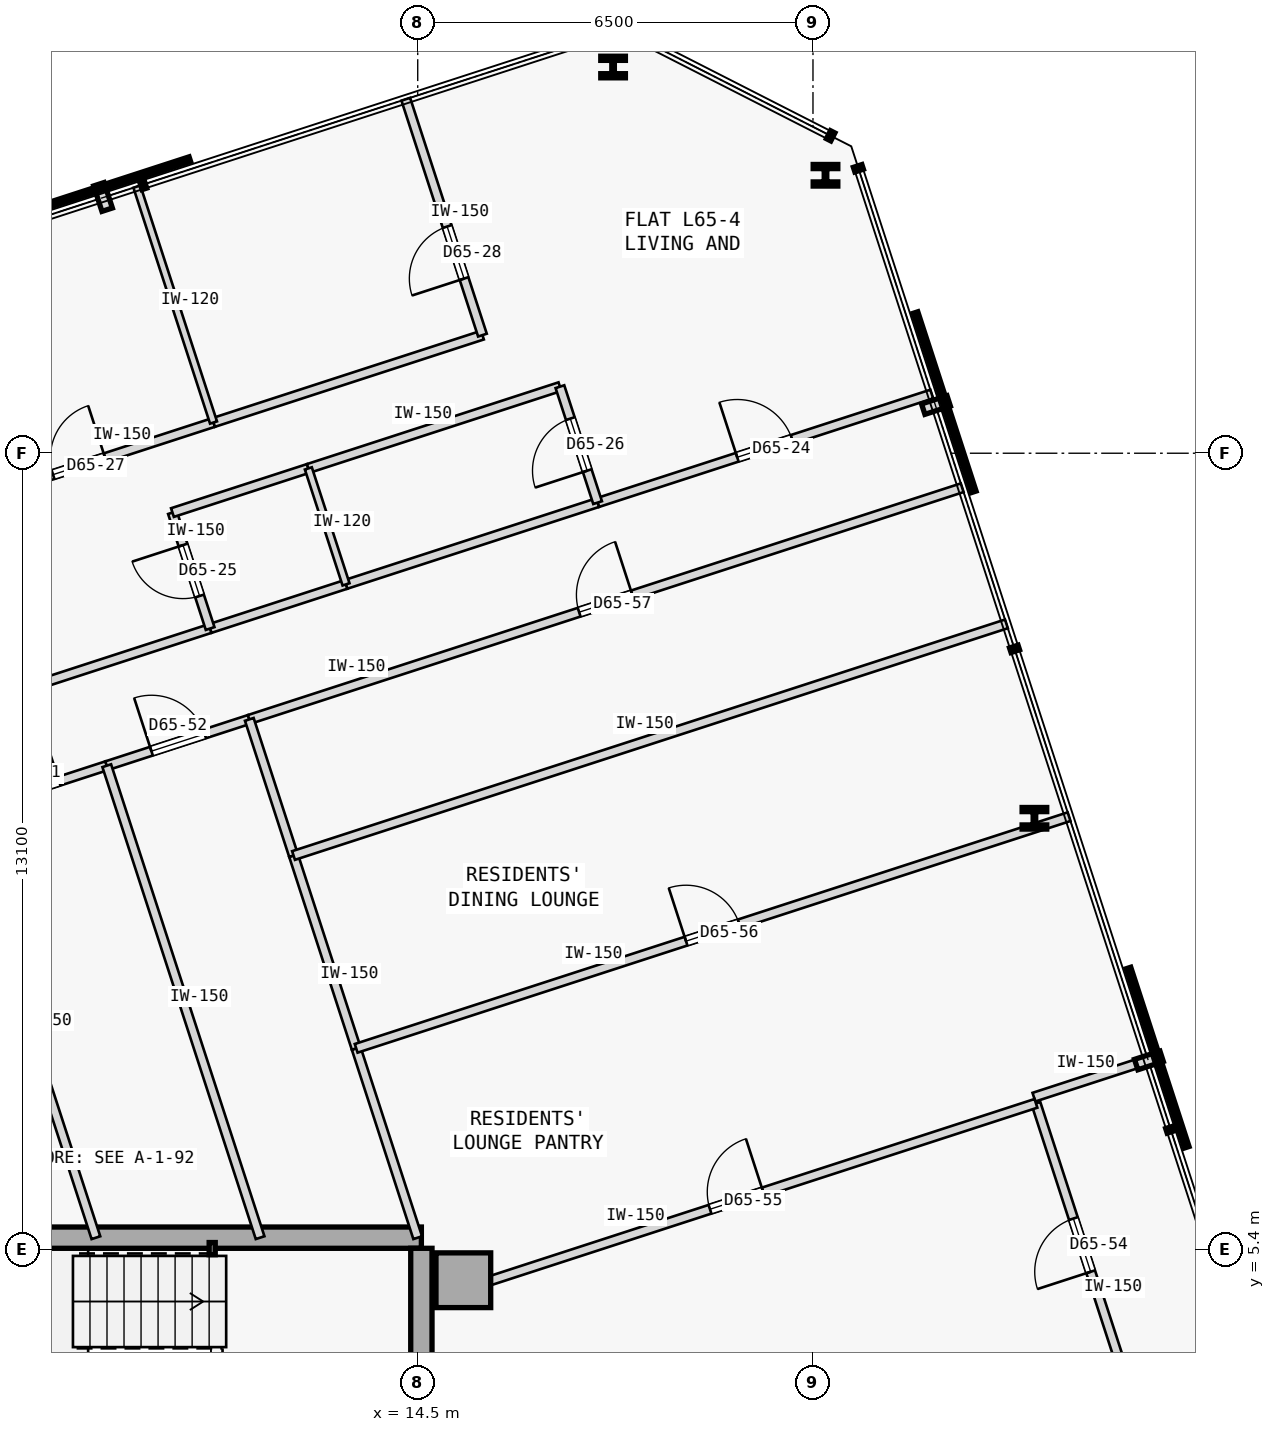
"""IFC4 building model, lengths in metres.
Left out: names, types, materials, properties, quantities, classifications, styles, units other than length and angle.
Written with IfcOpenShell. Run it as: python <this file> out.ifc"""

import sys

from ifc_helpers import new_model, si_unit, direction, frame, frame_2d, origin, origin_2d, place, context, subcontext, project, spatial, rectangle, hollow_rectangle, i_section, extrude, element, fill, save


model = new_model("IFC4")
c1 = context("Model", 3, precision=1e-05, world=origin(), true_north=direction((0.0, 1.0)))
c2 = subcontext(c1, "Body", "Model", "MODEL_VIEW")
j1 = project(units=[si_unit("LENGTHUNIT", "METRE"), si_unit("PLANEANGLEUNIT", "RADIAN")], contexts=[c1])
p1 = place(None, origin())
s1 = spatial("IfcSite", under=j1, at=p1, CompositionType="ELEMENT")
p2 = place(p1, origin())
s2 = spatial("IfcBuilding", under=s1, at=p2, CompositionType="ELEMENT")
p3 = place(p2, frame((0.0, 0.0, 244.4)))
s3 = spatial("IfcBuildingStorey", under=s2, at=p3, CompositionType="ELEMENT", Elevation=244.4)
p4 = place(p3, frame((15.25, 4.9, 0.0), z_axis=(0.0, 0.0, 1.0), x_axis=(1.0, 0.0, 0.0)))
e1 = element("IfcColumn", 1, at=p4, inside=s3, PredefinedType="COLUMN", context=c2, shape_type="SweptSolid", body=[
    extrude(rectangle(XDim=0.9, YDim=0.9, at=origin_2d()), origin(), (0.0, 0.0, 1.0), 3.35),
])
p5 = place(p3, frame((3.15, 5.6, 0.0), z_axis=(0.0, 0.0, 1.0), x_axis=(1.0, 0.0, 0.0)))
e2 = element("IfcWall", 2, at=p5, inside=s3, PredefinedType="SHEAR", context=c2, shape_type="SweptSolid", body=[
    extrude(rectangle(XDim=11.41, YDim=0.35, at=frame_2d((5.705, 0.0))), origin(), (0.0, 0.0, 1.0), 3.125),
])
p6 = place(p3, frame((14.56, -5.425, 0.0), z_axis=(0.0, 0.0, 1.0), x_axis=(0.0, 1.0, 0.0)))
e3 = element("IfcWall", 3, at=p6, inside=s3, PredefinedType="SHEAR", context=c2, shape_type="SweptSolid", body=[
    extrude(rectangle(XDim=10.85, YDim=0.35, at=frame_2d((5.425, 0.0))), origin(), (0.0, 0.0, 1.0), 3.125),
])
p7 = place(p3, frame((11.12, 5.42, 0.0), z_axis=(0.0, 0.0, 1.0), x_axis=(1.0, 0.0, 0.0)))
e4 = element("IfcColumn", 4, at=p7, inside=s3, PredefinedType="COLUMN", context=c2, shape_type="SweptSolid", body=[
    extrude(hollow_rectangle(XDim=0.1, YDim=0.2, WallThickness=0.008, at=origin_2d()), origin(), (0.0, 0.0, 1.0), 3.35),
])
for number, where, z_axis, x_axis in (
    (5, (24.642, 12.497, 0.0), (0.0, 0.0, 1.0), (1.0, 0.0, 0.0)),
    (6, (21.206, 23.071, 0.0), (0.0, 0.0, 1.0), (1.0, 0.0, 0.0)),
    (7, (17.713, 24.851, 0.0), (0.0, 0.0, 1.0), (1.0, 0.0, 0.0)),
):
    element("IfcColumn", number, at=place(p3, frame(where, z_axis=z_axis, x_axis=x_axis)), inside=s3, PredefinedType="COLUMN", context=c2, shape_type="SweptSolid", body=[
        extrude(i_section(OverallWidth=0.405, OverallDepth=0.355, WebThickness=0.042, FlangeThickness=0.068, FilletRadius=0.015, at=origin_2d()), origin(), (0.0, 0.0, 1.0), 3.35),
    ])
p8 = place(p3, frame((7.615, 14.489, 0.0), z_axis=(0.0, 0.0, 1.0), x_axis=(0.951050780541, 0.309034646652, 0.0)))
e8 = element("IfcWall", 8, at=p8, inside=s3, PredefinedType="PARTITIONING", context=c2, shape_type="SweptSolid", body=[
    extrude(rectangle(XDim=3.65, YDim=0.15, at=frame_2d((1.825, 0.0))), origin(), (0.0, 0.0, 1.0), 3.125),
])
p9 = place(p3, frame((17.458, 17.688, 0.0), z_axis=(0.0, 0.0, 1.0), x_axis=(0.951064183239, 0.308993396953, 0.0)))
e9 = element("IfcWall", 9, at=p9, inside=s3, PredefinedType="PARTITIONING", context=c2, shape_type="SweptSolid", body=[
    extrude(rectangle(XDim=5.778, YDim=0.15, at=frame_2d((2.889, 0.0))), origin(), (0.0, 0.0, 1.0), 3.125),
])
p10 = place(p9, frame((2.414, 0.0, 0.0)))
e10 = element("IfcOpeningElement", 10, at=p10, cuts=e9, PredefinedType="OPENING", context=c2, shape_type="SweptSolid", body=[
    extrude(rectangle(XDim=0.95, YDim=2.15, at=frame_2d((0.475, 1.075))), frame((0.0, 0.085, 0.0), z_axis=(0.0, -1.0, 0.0), x_axis=(1.0, 0.0, 0.0)), (0.0, 0.0, 1.0), 0.17),
])
p11 = place(p3, frame((11.086, 15.617, 0.0), z_axis=(0.0, 0.0, 1.0), x_axis=(0.951045519245, 0.309050837767, 0.0)))
e11 = element("IfcWall", 11, at=p11, inside=s3, PredefinedType="PARTITIONING", context=c2, shape_type="SweptSolid", body=[
    extrude(rectangle(XDim=2.35, YDim=0.15, at=frame_2d((1.175, 0.0))), origin(), (0.0, 0.0, 1.0), 3.125),
])
p12 = place(p3, frame((13.321, 16.344, 0.0), z_axis=(0.0, 0.0, 1.0), x_axis=(0.951052627573, 0.309028962374, 0.0)))
e12 = element("IfcWall", 12, at=p12, inside=s3, PredefinedType="PARTITIONING", context=c2, shape_type="SweptSolid", body=[
    extrude(rectangle(XDim=4.35, YDim=0.15, at=frame_2d((2.175, 0.0))), origin(), (0.0, 0.0, 1.0), 3.125),
])
p13 = place(p3, frame((6.944, 12.568, 0.0), z_axis=(0.0, 0.0, 1.0), x_axis=(0.951042451835, 0.309060276981, 0.0)))
e13 = element("IfcWall", 13, at=p13, inside=s3, PredefinedType="PARTITIONING", context=c2, shape_type="SweptSolid", body=[
    extrude(rectangle(XDim=2.568, YDim=0.15, at=frame_2d((1.284, 0.0))), origin(), (0.0, 0.0, 1.0), 3.125),
])
p14 = place(p13, frame((0.824, 0.0, 0.0)))
e14 = element("IfcOpeningElement", 14, at=p14, cuts=e13, PredefinedType="OPENING", context=c2, shape_type="SweptSolid", body=[
    extrude(rectangle(XDim=0.92, YDim=2.15, at=frame_2d((0.46, 1.075))), frame((0.0, 0.085, 0.0), z_axis=(0.0, -1.0, 0.0), x_axis=(1.0, 0.0, 0.0)), (0.0, 0.0, 1.0), 0.17),
])
p15 = place(p3, frame((9.386, 13.362, 0.0), z_axis=(0.0, 0.0, 1.0), x_axis=(0.951052991774, 0.309027841526, 0.0)))
e15 = element("IfcWall", 15, at=p15, inside=s3, PredefinedType="PARTITIONING", context=c2, shape_type="SweptSolid", body=[
    extrude(rectangle(XDim=2.465, YDim=0.15, at=frame_2d((1.232, 0.0))), origin(), (0.0, 0.0, 1.0), 3.125),
])
p16 = place(p15, frame((0.772, 0.0, 0.0)))
e16 = element("IfcOpeningElement", 16, at=p16, cuts=e15, PredefinedType="OPENING", context=c2, shape_type="SweptSolid", body=[
    extrude(rectangle(XDim=0.92, YDim=2.15, at=frame_2d((0.46, 1.075))), frame((0.0, 0.085, 0.0), z_axis=(0.0, -1.0, 0.0), x_axis=(1.0, 0.0, 0.0)), (0.0, 0.0, 1.0), 0.17),
])
p17 = place(p3, frame((26.182, 3.145, 0.0), z_axis=(0.0, 0.0, 1.0), x_axis=(-0.309019653166, 0.951055652397, 0.0)))
e17 = element("IfcWall", 17, at=p17, inside=s3, PredefinedType="PARTITIONING", context=c2, shape_type="SweptSolid", body=[
    extrude(rectangle(XDim=4.904, YDim=0.15, at=frame_2d((2.452, 0.0))), origin(), (0.0, 0.0, 1.0), 3.125),
])
p18 = place(p17, frame((1.992, 0.0, 0.0)))
e18 = element("IfcOpeningElement", 18, at=p18, cuts=e17, PredefinedType="OPENING", context=c2, shape_type="SweptSolid", body=[
    extrude(rectangle(XDim=0.92, YDim=2.15, at=frame_2d((0.46, 1.075))), frame((0.0, 0.085, 0.0), z_axis=(0.0, -1.0, 0.0), x_axis=(1.0, 0.0, 0.0)), (0.0, 0.0, 1.0), 0.17),
])
p19 = place(p3, frame((24.634, 7.91, 0.0), z_axis=(0.0, 0.0, 1.0), x_axis=(0.951054051148, 0.309024581215, 0.0)))
e19 = element("IfcWall", 19, at=p19, inside=s3, PredefinedType="PARTITIONING", context=c2, shape_type="SweptSolid", body=[
    extrude(rectangle(XDim=1.975, YDim=0.15, at=frame_2d((0.988, 0.0))), origin(), (0.0, 0.0, 1.0), 3.125),
])
p20 = place(p3, frame((11.73, 14.123, 0.0), z_axis=(0.0, 0.0, 1.0), x_axis=(0.951060263663, 0.309005460926, 0.0)))
e20 = element("IfcWall", 20, at=p20, inside=s3, PredefinedType="PARTITIONING", context=c2, shape_type="SweptSolid", body=[
    extrude(rectangle(XDim=12.327, YDim=0.15, at=frame_2d((6.164, 0.0))), origin(), (0.0, 0.0, 1.0), 3.125),
])
p21 = place(p20, frame((5.704, 0.0, 0.0)))
e21 = element("IfcOpeningElement", 21, at=p21, cuts=e20, PredefinedType="OPENING", context=c2, shape_type="SweptSolid", body=[
    extrude(rectangle(XDim=0.92, YDim=2.15, at=frame_2d((0.46, 1.075))), frame((0.0, 0.085, 0.0), z_axis=(0.0, -1.0, 0.0), x_axis=(1.0, 0.0, 0.0)), (0.0, 0.0, 1.0), 0.17),
])
p22 = place(p3, frame((11.086, 15.617, 0.0), z_axis=(0.0, 0.0, 1.0), x_axis=(-0.309022749039, 0.951054646472, 0.0)))
e22 = element("IfcWall", 22, at=p22, inside=s3, PredefinedType="PARTITIONING", context=c2, shape_type="SweptSolid", body=[
    extrude(rectangle(XDim=2.005, YDim=0.15, at=frame_2d((1.002, 0.0))), origin(), (0.0, 0.0, 1.0), 3.125),
])
p23 = place(p22, frame((0.562, 0.0, 0.0)))
e23 = element("IfcOpeningElement", 23, at=p23, cuts=e22, PredefinedType="OPENING", context=c2, shape_type="SweptSolid", body=[
    extrude(rectangle(XDim=0.88, YDim=2.15, at=frame_2d((0.44, 1.075))), frame((0.0, 0.085, 0.0), z_axis=(0.0, -1.0, 0.0), x_axis=(1.0, 0.0, 0.0)), (0.0, 0.0, 1.0), 0.17),
])
p24 = place(p3, frame((10.466, 17.524, 0.0), z_axis=(0.0, 0.0, 1.0), x_axis=(0.951076048914, 0.308956872689, 0.0)))
e24 = element("IfcWall", 24, at=p24, inside=s3, PredefinedType="PARTITIONING", context=c2, shape_type="SweptSolid", body=[
    extrude(rectangle(XDim=2.35, YDim=0.15, at=frame_2d((1.175, 0.0))), origin(), (0.0, 0.0, 1.0), 3.125),
])
p25 = place(p3, frame((12.701, 18.25, 0.0), z_axis=(0.0, 0.0, 1.0), x_axis=(0.951052627573, 0.309028962374, 0.0)))
e25 = element("IfcWall", 25, at=p25, inside=s3, PredefinedType="PARTITIONING", context=c2, shape_type="SweptSolid", body=[
    extrude(rectangle(XDim=4.35, YDim=0.15, at=frame_2d((2.175, 0.0))), origin(), (0.0, 0.0, 1.0), 3.125),
])
p26 = place(p3, frame((17.458, 17.688, 0.0), z_axis=(0.0, 0.0, 1.0), x_axis=(-0.309058537449, 0.951043017129, 0.0)))
e26 = element("IfcWall", 26, at=p26, inside=s3, PredefinedType="PARTITIONING", context=c2, shape_type="SweptSolid", body=[
    extrude(rectangle(XDim=2.005, YDim=0.15, at=frame_2d((1.002, 0.0))), origin(), (0.0, 0.0, 1.0), 3.125),
])
p27 = place(p26, frame((0.552, 0.0, 0.0)))
e27 = element("IfcOpeningElement", 27, at=p27, cuts=e26, PredefinedType="OPENING", context=c2, shape_type="SweptSolid", body=[
    extrude(rectangle(XDim=0.9, YDim=2.15, at=frame_2d((0.45, 1.075))), frame((0.0, 0.085, 0.0), z_axis=(0.0, -1.0, 0.0), x_axis=(1.0, 0.0, 0.0)), (0.0, 0.0, 1.0), 0.17),
])
p28 = place(p3, frame((6.719, 17.568, 0.0), z_axis=(0.0, 0.0, 1.0), x_axis=(0.951050272606, 0.309036209813, 0.0)))
e28 = element("IfcWall", 28, at=p28, inside=s3, PredefinedType="PARTITIONING", context=c2, shape_type="SweptSolid", body=[
    extrude(rectangle(XDim=4.65, YDim=0.15, at=frame_2d((2.325, 0.0))), origin(), (0.0, 0.0, 1.0), 3.125),
])
p29 = place(p28, frame((1.875, 0.0, 0.0)))
e29 = element("IfcOpeningElement", 29, at=p29, cuts=e28, PredefinedType="OPENING", context=c2, shape_type="SweptSolid", body=[
    extrude(rectangle(XDim=0.9, YDim=2.15, at=frame_2d((0.45, 1.075))), frame((0.0, 0.085, 0.0), z_axis=(0.0, -1.0, 0.0), x_axis=(1.0, 0.0, 0.0)), (0.0, 0.0, 1.0), 0.17),
])
p30 = place(p3, frame((11.142, 19.005, 0.0), z_axis=(0.0, 0.0, 1.0), x_axis=(0.951065702951, 0.308988719326, 0.0)))
e30 = element("IfcWall", 30, at=p30, inside=s3, PredefinedType="PARTITIONING", context=c2, shape_type="SweptSolid", body=[
    extrude(rectangle(XDim=4.65, YDim=0.15, at=frame_2d((2.325, 0.0))), origin(), (0.0, 0.0, 1.0), 3.125),
])
p31 = place(p3, frame((15.564, 20.442, 0.0), z_axis=(0.0, 0.0, 1.0), x_axis=(-0.309018403393, 0.951056058476, 0.0)))
e31 = element("IfcWall", 31, at=p31, inside=s3, PredefinedType="PARTITIONING", context=c2, shape_type="SweptSolid", body=[
    extrude(rectangle(XDim=4.079, YDim=0.15, at=frame_2d((2.04, 0.0))), origin(), (0.0, 0.0, 1.0), 3.125),
])
p32 = place(p31, frame((0.978, 0.0, 0.0)))
e32 = element("IfcOpeningElement", 32, at=p32, cuts=e31, PredefinedType="OPENING", context=c2, shape_type="SweptSolid", body=[
    extrude(rectangle(XDim=0.9, YDim=2.15, at=frame_2d((0.45, 1.075))), frame((0.0, 0.085, 0.0), z_axis=(0.0, -1.0, 0.0), x_axis=(1.0, 0.0, 0.0)), (0.0, 0.0, 1.0), 0.17),
])
p33 = place(p3, frame((13.321, 16.344, 0.0), z_axis=(0.0, 0.0, 1.0), x_axis=(-0.309058537449, 0.951043017129, 0.0)))
e33 = element("IfcWall", 33, at=p33, inside=s3, PredefinedType="PARTITIONING", context=c2, shape_type="SweptSolid", body=[
    extrude(rectangle(XDim=2.005, YDim=0.12, at=frame_2d((1.002, 0.0))), origin(), (0.0, 0.0, 1.0), 3.125),
])
p34 = place(p3, frame((11.142, 19.005, 0.0), z_axis=(0.0, 0.0, 1.0), x_axis=(-0.309018403393, 0.951056058476, 0.0)))
e34 = element("IfcWall", 34, at=p34, inside=s3, PredefinedType="PARTITIONING", context=c2, shape_type="SweptSolid", body=[
    extrude(rectangle(XDim=4.079, YDim=0.12, at=frame_2d((2.04, 0.0))), origin(), (0.0, 0.0, 1.0), 3.125),
])
p35 = place(p3, frame((9.208, 5.6, 0.0), z_axis=(0.0, 0.0, 1.0), x_axis=(-0.309021275068, 0.951055125403, 0.0)))
e35 = element("IfcWall", 35, at=p35, inside=s3, PredefinedType="PARTITIONING", context=c2, shape_type="SweptSolid", body=[
    extrude(rectangle(XDim=7.327, YDim=0.15, at=frame_2d((3.664, 0.0))), origin(), (0.0, 0.0, 1.0), 3.125),
])
p36 = place(p3, frame((11.908, 5.6, 0.0), z_axis=(0.0, 0.0, 1.0), x_axis=(-0.308994076163, 0.951063962568, 0.0)))
e36 = element("IfcWall", 36, at=p36, inside=s3, PredefinedType="PARTITIONING", context=c2, shape_type="SweptSolid", body=[
    extrude(rectangle(XDim=8.161, YDim=0.15, at=frame_2d((4.081, 0.0))), origin(), (0.0, 0.0, 1.0), 3.125),
])
p37 = place(p3, frame((14.5, 5.6, 0.0), z_axis=(0.0, 0.0, 1.0), x_axis=(-0.309015253813, 0.951057081836, 0.0)))
e37 = element("IfcWall", 37, at=p37, inside=s3, PredefinedType="PARTITIONING", context=c2, shape_type="SweptSolid", body=[
    extrude(rectangle(XDim=3.274, YDim=0.15, at=frame_2d((1.637, 0.0))), origin(), (0.0, 0.0, 1.0), 3.125),
])
p38 = place(p3, frame((13.488, 8.714, 0.0), z_axis=(0.0, 0.0, 1.0), x_axis=(-0.308946982245, 0.951079261766, 0.0)))
e38 = element("IfcWall", 38, at=p38, inside=s3, PredefinedType="PARTITIONING", context=c2, shape_type="SweptSolid", body=[
    extrude(rectangle(XDim=3.334, YDim=0.15, at=frame_2d((1.667, 0.0))), origin(), (0.0, 0.0, 1.0), 3.125),
])
p39 = place(p3, frame((12.458, 11.885, 0.0), z_axis=(0.0, 0.0, 1.0), x_axis=(-0.309062621189, 0.951041690035, 0.0)))
e39 = element("IfcWall", 39, at=p39, inside=s3, PredefinedType="PARTITIONING", context=c2, shape_type="SweptSolid", body=[
    extrude(rectangle(XDim=2.354, YDim=0.15, at=frame_2d((1.177, 0.0))), origin(), (0.0, 0.0, 1.0), 3.125),
])
p40 = place(p3, frame((14.821, 4.61, 0.0), z_axis=(0.0, 0.0, 1.0), x_axis=(0.951063700751, 0.30899488202, 0.0)))
e40 = element("IfcWall", 40, at=p40, inside=s3, PredefinedType="PARTITIONING", context=c2, shape_type="SweptSolid", body=[
    extrude(rectangle(XDim=10.352, YDim=0.15, at=frame_2d((5.176, 0.0))), origin(), (0.0, 0.0, 1.0), 3.125),
])
p41 = place(p40, frame((4.716, 0.0, 0.0)))
e41 = element("IfcOpeningElement", 41, at=p41, cuts=e40, PredefinedType="OPENING", context=c2, shape_type="SweptSolid", body=[
    extrude(rectangle(XDim=0.92, YDim=2.15, at=frame_2d((0.46, 1.075))), frame((0.0, 0.085, 0.0), z_axis=(0.0, -1.0, 0.0), x_axis=(1.0, 0.0, 0.0)), (0.0, 0.0, 1.0), 0.17),
])
p42 = place(p3, frame((13.488, 8.714, 0.0), z_axis=(0.0, 0.0, 1.0), x_axis=(0.951062154725, 0.308999640533, 0.0)))
e42 = element("IfcWall", 42, at=p42, inside=s3, PredefinedType="PARTITIONING", context=c2, shape_type="SweptSolid", body=[
    extrude(rectangle(XDim=12.327, YDim=0.15, at=frame_2d((6.164, 0.0))), origin(), (0.0, 0.0, 1.0), 3.125),
])
p43 = place(p42, frame((5.704, 0.0, 0.0)))
e43 = element("IfcOpeningElement", 43, at=p43, cuts=e42, PredefinedType="OPENING", context=c2, shape_type="SweptSolid", body=[
    extrude(rectangle(XDim=0.92, YDim=2.15, at=frame_2d((0.46, 1.075))), frame((0.0, 0.085, 0.0), z_axis=(0.0, -1.0, 0.0), x_axis=(1.0, 0.0, 0.0)), (0.0, 0.0, 1.0), 0.17),
])
p44 = place(p3, frame((12.458, 11.885, 0.0), z_axis=(0.0, 0.0, 1.0), x_axis=(0.951060263663, 0.309005460926, 0.0)))
e44 = element("IfcWall", 44, at=p44, inside=s3, PredefinedType="PARTITIONING", context=c2, shape_type="SweptSolid", body=[
    extrude(rectangle(XDim=12.327, YDim=0.15, at=frame_2d((6.164, 0.0))), origin(), (0.0, 0.0, 1.0), 3.125),
])
p45 = place(p10, origin())
e45 = element("IfcDoor", 45, at=p45, inside=s3, OperationType="SINGLE_SWING_LEFT", PredefinedType="DOOR", context=c2, shape_type="SweptSolid", body=[
    extrude(rectangle(XDim=0.95, YDim=2.15, at=frame_2d((0.475, 1.075))), frame((0.0, 0.025, 0.0), z_axis=(0.0, -1.0, 0.0), x_axis=(1.0, 0.0, 0.0)), (0.0, 0.0, 1.0), 0.05),
])
fill(e10, e45)
p46 = place(p23, origin())
e46 = element("IfcDoor", 46, at=p46, inside=s3, OperationType="SINGLE_SWING_RIGHT", PredefinedType="DOOR", context=c2, shape_type="SweptSolid", body=[
    extrude(rectangle(XDim=0.88, YDim=2.15, at=frame_2d((0.44, 1.075))), frame((0.0, 0.025, 0.0), z_axis=(0.0, -1.0, 0.0), x_axis=(1.0, 0.0, 0.0)), (0.0, 0.0, 1.0), 0.05),
])
fill(e23, e46)
p47 = place(p27, origin())
e47 = element("IfcDoor", 47, at=p47, inside=s3, OperationType="SINGLE_SWING_LEFT", PredefinedType="DOOR", context=c2, shape_type="SweptSolid", body=[
    extrude(rectangle(XDim=0.9, YDim=2.15, at=frame_2d((0.45, 1.075))), frame((0.0, 0.025, 0.0), z_axis=(0.0, -1.0, 0.0), x_axis=(1.0, 0.0, 0.0)), (0.0, 0.0, 1.0), 0.05),
])
fill(e27, e47)
p48 = place(p29, origin())
e48 = element("IfcDoor", 48, at=p48, inside=s3, OperationType="SINGLE_SWING_RIGHT", PredefinedType="DOOR", context=c2, shape_type="SweptSolid", body=[
    extrude(rectangle(XDim=0.9, YDim=2.15, at=frame_2d((0.45, 1.075))), frame((0.0, 0.025, 0.0), z_axis=(0.0, -1.0, 0.0), x_axis=(1.0, 0.0, 0.0)), (0.0, 0.0, 1.0), 0.05),
])
fill(e29, e48)
p49 = place(p32, origin())
e49 = element("IfcDoor", 49, at=p49, inside=s3, OperationType="SINGLE_SWING_LEFT", PredefinedType="DOOR", context=c2, shape_type="SweptSolid", body=[
    extrude(rectangle(XDim=0.9, YDim=2.15, at=frame_2d((0.45, 1.075))), frame((0.0, 0.025, 0.0), z_axis=(0.0, -1.0, 0.0), x_axis=(1.0, 0.0, 0.0)), (0.0, 0.0, 1.0), 0.05),
])
fill(e32, e49)
p50 = place(p14, origin())
e50 = element("IfcDoor", 50, at=p50, inside=s3, OperationType="SINGLE_SWING_RIGHT", PredefinedType="DOOR", context=c2, shape_type="SweptSolid", body=[
    extrude(rectangle(XDim=0.92, YDim=2.15, at=frame_2d((0.46, 1.075))), frame((0.0, 0.025, 0.0), z_axis=(0.0, -1.0, 0.0), x_axis=(1.0, 0.0, 0.0)), (0.0, 0.0, 1.0), 0.05),
])
fill(e14, e50)
p51 = place(p16, origin())
e51 = element("IfcDoor", 51, at=p51, inside=s3, OperationType="SINGLE_SWING_LEFT", PredefinedType="DOOR", context=c2, shape_type="SweptSolid", body=[
    extrude(rectangle(XDim=0.92, YDim=2.15, at=frame_2d((0.46, 1.075))), frame((0.0, 0.025, 0.0), z_axis=(0.0, -1.0, 0.0), x_axis=(1.0, 0.0, 0.0)), (0.0, 0.0, 1.0), 0.05),
])
fill(e16, e51)
p52 = place(p18, origin())
e52 = element("IfcDoor", 52, at=p52, inside=s3, OperationType="SINGLE_SWING_LEFT", PredefinedType="DOOR", context=c2, shape_type="SweptSolid", body=[
    extrude(rectangle(XDim=0.92, YDim=2.15, at=frame_2d((0.46, 1.075))), frame((0.0, 0.025, 0.0), z_axis=(0.0, -1.0, 0.0), x_axis=(1.0, 0.0, 0.0)), (0.0, 0.0, 1.0), 0.05),
])
fill(e18, e52)
p53 = place(p41, origin())
e53 = element("IfcDoor", 53, at=p53, inside=s3, OperationType="SINGLE_SWING_RIGHT", PredefinedType="DOOR", context=c2, shape_type="SweptSolid", body=[
    extrude(rectangle(XDim=0.92, YDim=2.15, at=frame_2d((0.46, 1.075))), frame((0.0, 0.025, 0.0), z_axis=(0.0, -1.0, 0.0), x_axis=(1.0, 0.0, 0.0)), (0.0, 0.0, 1.0), 0.05),
])
fill(e41, e53)
p54 = place(p43, origin())
e54 = element("IfcDoor", 54, at=p54, inside=s3, OperationType="SINGLE_SWING_LEFT", PredefinedType="DOOR", context=c2, shape_type="SweptSolid", body=[
    extrude(rectangle(XDim=0.92, YDim=2.15, at=frame_2d((0.46, 1.075))), frame((0.0, 0.025, 0.0), z_axis=(0.0, -1.0, 0.0), x_axis=(1.0, 0.0, 0.0)), (0.0, 0.0, 1.0), 0.05),
])
fill(e43, e54)
p55 = place(p21, origin())
e55 = element("IfcDoor", 55, at=p55, inside=s3, OperationType="SINGLE_SWING_RIGHT", PredefinedType="DOOR", context=c2, shape_type="SweptSolid", body=[
    extrude(rectangle(XDim=0.92, YDim=2.15, at=frame_2d((0.46, 1.075))), frame((0.0, 0.025, 0.0), z_axis=(0.0, -1.0, 0.0), x_axis=(1.0, 0.0, 0.0)), (0.0, 0.0, 1.0), 0.05),
])
fill(e21, e55)
save(model, sys.argv[1])
